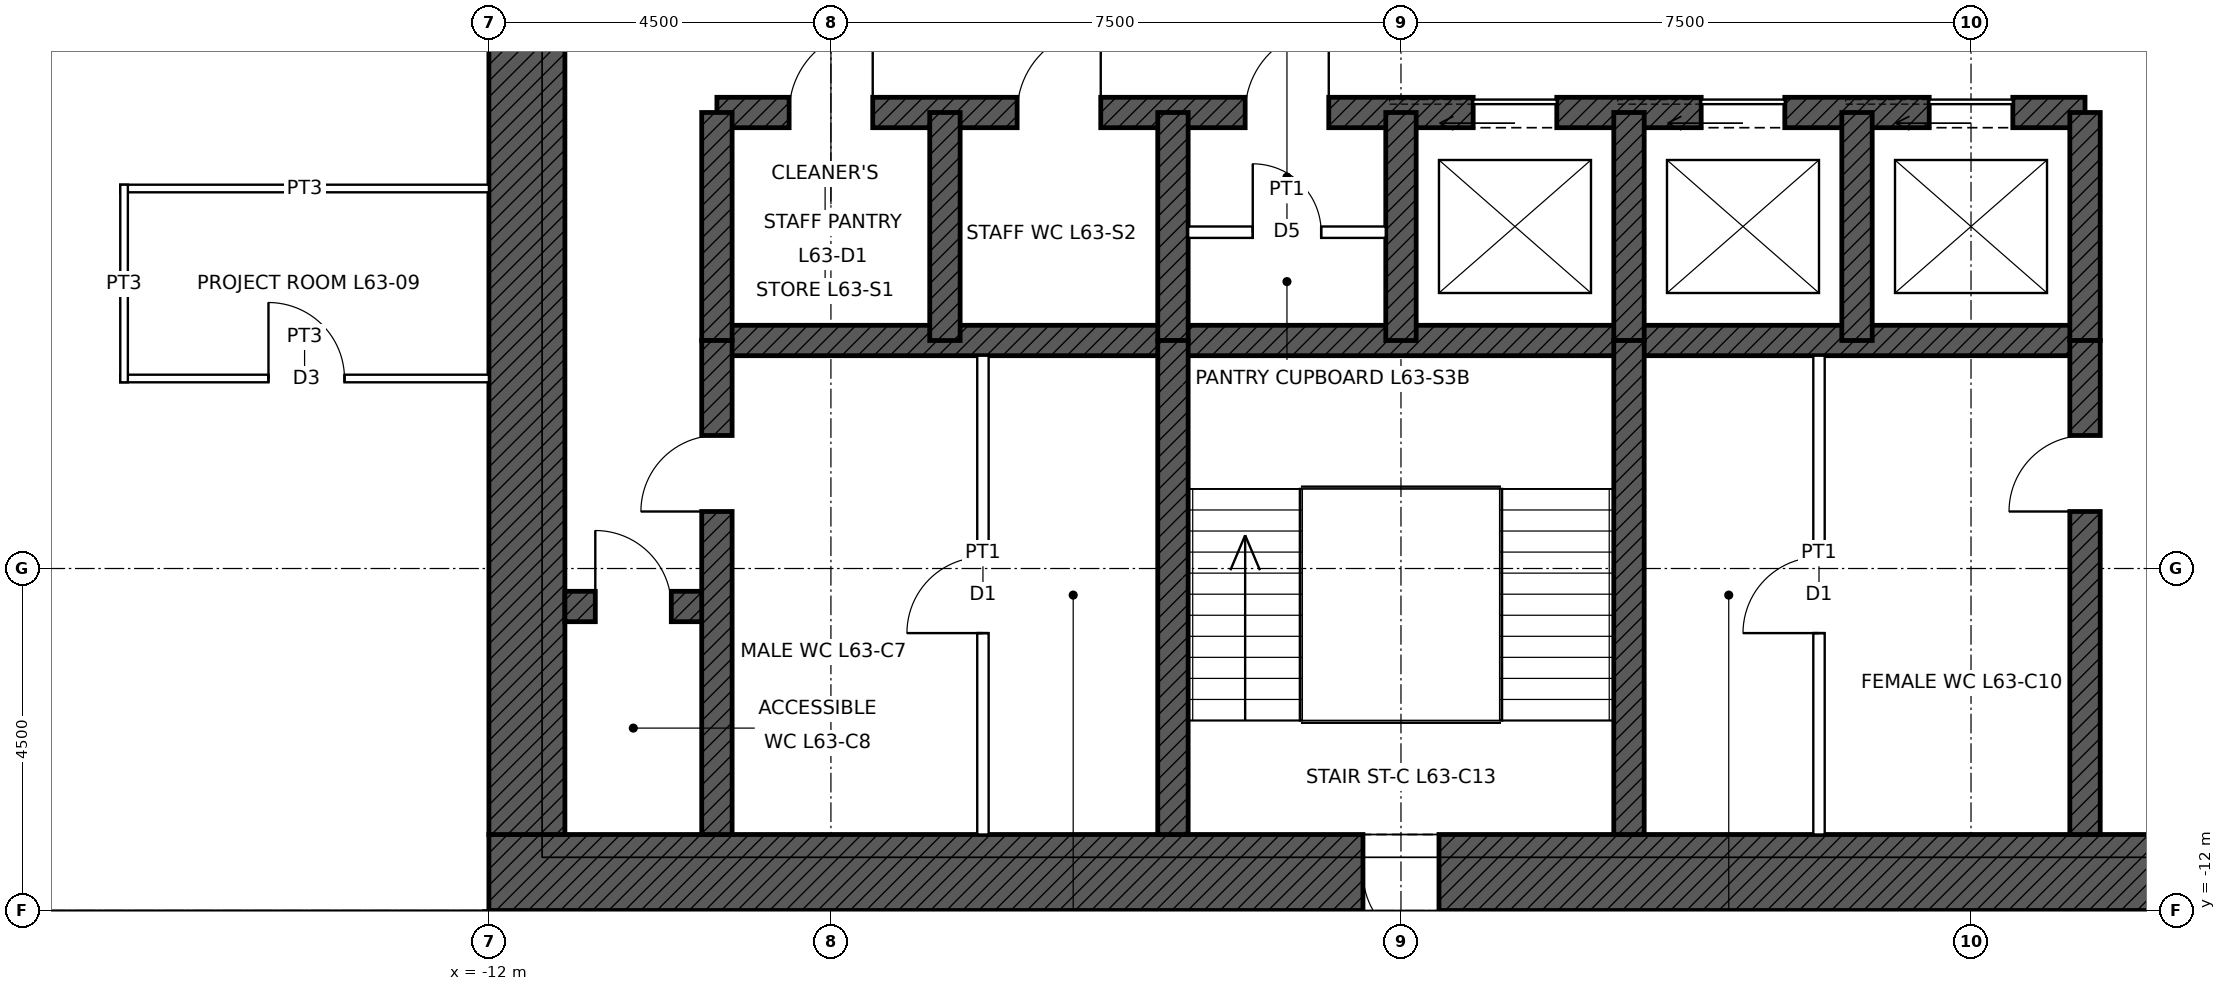
"""IFC4 building model, lengths in metres.
Left out: names, types, materials, properties, quantities, classifications, styles, units other than length and angle.
Written with IfcOpenShell. Run it as: python <this file> out.ifc"""

import sys

from ifc_helpers import new_model, si_unit, direction, frame, frame_2d, origin, place, context, subcontext, project, spatial, rectangle, extrude, element, fill, save


model = new_model("IFC4")
c1 = context("Model", 3, precision=1e-05, world=origin(), true_north=direction((0.0, 1.0)))
c2 = subcontext(c1, "Body", "Model", "MODEL_VIEW")
j1 = project(units=[si_unit("LENGTHUNIT", "METRE"), si_unit("PLANEANGLEUNIT", "RADIAN")], contexts=[c1])
p1 = place(None, origin())
s1 = spatial("IfcSite", under=j1, at=p1, CompositionType="ELEMENT")
p2 = place(p1, origin())
s2 = spatial("IfcBuilding", under=s1, at=p2, CompositionType="ELEMENT")
p3 = place(p2, frame((0.0, 0.0, 287.9)))
s3 = spatial("IfcBuildingStorey", under=s2, at=p3, CompositionType="ELEMENT", Elevation=287.9)
p4 = place(p3, frame((12.0, -11.5, 0.0), z_axis=(0.0, 0.0, 1.0), x_axis=(-1.0, 0.0, 0.0)))
e1 = element("IfcWall", 1, at=p4, inside=s3, PredefinedType="SHEAR", context=c2, shape_type="SweptSolid", body=[
    extrude(rectangle(XDim=24.0, YDim=1.0, at=frame_2d((12.0, 0.0))), origin(), (0.0, 0.0, 1.0), 4.0),
])
p5 = place(p4, frame((11.5, 0.0, 0.0)))
e2 = element("IfcOpeningElement", 2, at=p5, cuts=e1, PredefinedType="OPENING", context=c2, shape_type="SweptSolid", body=[
    extrude(rectangle(XDim=1.0, YDim=2.1, at=frame_2d((0.5, 1.05))), frame((0.0, 0.51, 0.0), z_axis=(0.0, -1.0, 0.0), x_axis=(1.0, 0.0, 0.0)), (0.0, 0.0, 1.0), 1.02),
])
p6 = place(p4, frame((1.0, 0.0, 0.0)))
e3 = element("IfcOpeningElement", 3, at=p6, cuts=e1, PredefinedType="OPENING", context=c2, shape_type="SweptSolid", body=[
    extrude(rectangle(XDim=1.0, YDim=2.4, at=frame_2d((0.5, 1.2))), frame((0.0, 0.51, 0.0), z_axis=(0.0, -1.0, 0.0), x_axis=(1.0, 0.0, 0.0)), (0.0, 0.0, 1.0), 1.02),
])
p7 = place(p3, frame((-11.5, -11.0, 0.0), z_axis=(0.0, 0.0, 1.0), x_axis=(0.0, 1.0, 0.0)))
e4 = element("IfcWall", 4, at=p7, inside=s3, PredefinedType="SHEAR", context=c2, shape_type="SweptSolid", body=[
    extrude(rectangle(XDim=22.0, YDim=1.0, at=frame_2d((11.0, 0.0))), origin(), (0.0, 0.0, 1.0), 4.0),
])
p8 = place(p7, frame((10.5, 0.0, 0.0)))
e5 = element("IfcOpeningElement", 5, at=p8, cuts=e4, PredefinedType="OPENING", context=c2, shape_type="SweptSolid", body=[
    extrude(rectangle(XDim=1.0, YDim=2.4, at=frame_2d((0.5, 1.2))), frame((0.0, 0.51, 0.0), z_axis=(0.0, -1.0, 0.0), x_axis=(1.0, 0.0, 0.0)), (0.0, 0.0, 1.0), 1.02),
])
p9 = place(p3, frame((-9.0, -1.5, 0.0), z_axis=(0.0, 0.0, 1.0), x_axis=(1.0, 0.0, 0.0)))
e6 = element("IfcWall", 6, at=p9, inside=s3, PredefinedType="SHEAR", context=c2, shape_type="SweptSolid", body=[
    extrude(rectangle(XDim=18.0, YDim=0.4, at=frame_2d((9.0, 0.0))), origin(), (0.0, 0.0, 1.0), 4.0),
])
p10 = place(p9, frame((9.95, 0.0, 0.0)))
e7 = element("IfcOpeningElement", 7, at=p10, cuts=e6, PredefinedType="OPENING", context=c2, shape_type="SweptSolid", body=[
    extrude(rectangle(XDim=1.1, YDim=2.1, at=frame_2d((0.55, 1.05))), frame((0.0, 0.21, 0.0), z_axis=(0.0, -1.0, 0.0), x_axis=(1.0, 0.0, 0.0)), (0.0, 0.0, 1.0), 0.42),
])
p11 = place(p9, frame((12.95, 0.0, 0.0)))
e8 = element("IfcOpeningElement", 8, at=p11, cuts=e6, PredefinedType="OPENING", context=c2, shape_type="SweptSolid", body=[
    extrude(rectangle(XDim=1.1, YDim=2.1, at=frame_2d((0.55, 1.05))), frame((0.0, 0.21, 0.0), z_axis=(0.0, -1.0, 0.0), x_axis=(1.0, 0.0, 0.0)), (0.0, 0.0, 1.0), 0.42),
])
p12 = place(p9, frame((15.95, 0.0, 0.0)))
e9 = element("IfcOpeningElement", 9, at=p12, cuts=e6, PredefinedType="OPENING", context=c2, shape_type="SweptSolid", body=[
    extrude(rectangle(XDim=1.1, YDim=2.1, at=frame_2d((0.55, 1.05))), frame((0.0, 0.21, 0.0), z_axis=(0.0, -1.0, 0.0), x_axis=(1.0, 0.0, 0.0)), (0.0, 0.0, 1.0), 0.42),
])
p13 = place(p9, frame((0.95, 0.0, 0.0)))
e10 = element("IfcOpeningElement", 10, at=p13, cuts=e6, PredefinedType="OPENING", context=c2, shape_type="SweptSolid", body=[
    extrude(rectangle(XDim=1.1, YDim=2.1, at=frame_2d((0.55, 1.05))), frame((0.0, 0.21, 0.0), z_axis=(0.0, -1.0, 0.0), x_axis=(1.0, 0.0, 0.0)), (0.0, 0.0, 1.0), 0.42),
])
p14 = place(p9, frame((3.95, 0.0, 0.0)))
e11 = element("IfcOpeningElement", 11, at=p14, cuts=e6, PredefinedType="OPENING", context=c2, shape_type="SweptSolid", body=[
    extrude(rectangle(XDim=1.1, YDim=2.1, at=frame_2d((0.55, 1.05))), frame((0.0, 0.21, 0.0), z_axis=(0.0, -1.0, 0.0), x_axis=(1.0, 0.0, 0.0)), (0.0, 0.0, 1.0), 0.42),
])
p15 = place(p9, frame((6.95, 0.0, 0.0)))
e12 = element("IfcOpeningElement", 12, at=p15, cuts=e6, PredefinedType="OPENING", context=c2, shape_type="SweptSolid", body=[
    extrude(rectangle(XDim=1.1, YDim=2.1, at=frame_2d((0.55, 1.05))), frame((0.0, 0.21, 0.0), z_axis=(0.0, -1.0, 0.0), x_axis=(1.0, 0.0, 0.0)), (0.0, 0.0, 1.0), 0.42),
])
p16 = place(p3, frame((-9.0, -4.5, 0.0), z_axis=(0.0, 0.0, 1.0), x_axis=(1.0, 0.0, 0.0)))
e13 = element("IfcWall", 13, at=p16, inside=s3, PredefinedType="SHEAR", context=c2, shape_type="SweptSolid", body=[
    extrude(rectangle(XDim=18.0, YDim=0.4, at=frame_2d((9.0, 0.0))), origin(), (0.0, 0.0, 1.0), 4.0),
])
p17 = place(p3, frame((-11.0, -8.0, 0.0), z_axis=(0.0, 0.0, 1.0), x_axis=(1.0, 0.0, 0.0)))
e14 = element("IfcWall", 14, at=p17, inside=s3, PredefinedType="SHEAR", context=c2, shape_type="SweptSolid", body=[
    extrude(rectangle(XDim=2.0, YDim=0.4, at=frame_2d((1.0, 0.0))), origin(), (0.0, 0.0, 1.0), 4.0),
])
p18 = place(p17, frame((0.4, 0.0, 0.0)))
e15 = element("IfcOpeningElement", 15, at=p18, cuts=e14, PredefinedType="OPENING", context=c2, shape_type="SweptSolid", body=[
    extrude(rectangle(XDim=1.0, YDim=2.1, at=frame_2d((0.5, 1.05))), frame((0.0, 0.21, 0.0), z_axis=(0.0, -1.0, 0.0), x_axis=(1.0, 0.0, 0.0)), (0.0, 0.0, 1.0), 0.42),
])
for number, where, z_axis, x_axis in (
    (16, (-9.0, -4.5, 0.0), (0.0, 0.0, 1.0), (0.0, 1.0, 0.0)),
    (17, (9.0, -4.5, 0.0), (0.0, 0.0, 1.0), (0.0, 1.0, 0.0)),
    (18, (-6.0, -4.5, 0.0), (0.0, 0.0, 1.0), (0.0, 1.0, 0.0)),
    (19, (-3.0, -4.5, 0.0), (0.0, 0.0, 1.0), (0.0, 1.0, 0.0)),
    (20, (0.0, -4.5, 0.0), (0.0, 0.0, 1.0), (0.0, 1.0, 0.0)),
    (21, (3.0, -4.5, 0.0), (0.0, 0.0, 1.0), (0.0, 1.0, 0.0)),
    (22, (6.0, -4.5, 0.0), (0.0, 0.0, 1.0), (0.0, 1.0, 0.0)),
):
    element("IfcWall", number, at=place(p3, frame(where, z_axis=z_axis, x_axis=x_axis)), inside=s3, PredefinedType="SHEAR", context=c2, shape_type="SweptSolid", body=[
        extrude(rectangle(XDim=3.0, YDim=0.4, at=frame_2d((1.5, 0.0))), origin(), (0.0, 0.0, 1.0), 4.0),
    ])
p19 = place(p3, frame((-9.0, -11.0, 0.0), z_axis=(0.0, 0.0, 1.0), x_axis=(0.0, 1.0, 0.0)))
e23 = element("IfcWall", 23, at=p19, inside=s3, PredefinedType="SHEAR", context=c2, shape_type="SweptSolid", body=[
    extrude(rectangle(XDim=6.5, YDim=0.4, at=frame_2d((3.25, 0.0))), origin(), (0.0, 0.0, 1.0), 4.0),
])
p20 = place(p19, frame((4.25, 0.0, 0.0)))
e24 = element("IfcOpeningElement", 24, at=p20, cuts=e23, PredefinedType="OPENING", context=c2, shape_type="SweptSolid", body=[
    extrude(rectangle(XDim=1.0, YDim=2.1, at=frame_2d((0.5, 1.05))), frame((0.0, 0.21, 0.0), z_axis=(0.0, -1.0, 0.0), x_axis=(1.0, 0.0, 0.0)), (0.0, 0.0, 1.0), 0.42),
])
p21 = place(p3, frame((9.0, -11.0, 0.0), z_axis=(0.0, 0.0, 1.0), x_axis=(0.0, 1.0, 0.0)))
e25 = element("IfcWall", 25, at=p21, inside=s3, PredefinedType="SHEAR", context=c2, shape_type="SweptSolid", body=[
    extrude(rectangle(XDim=6.5, YDim=0.4, at=frame_2d((3.25, 0.0))), origin(), (0.0, 0.0, 1.0), 4.0),
])
p22 = place(p21, frame((4.25, 0.0, 0.0)))
e26 = element("IfcOpeningElement", 26, at=p22, cuts=e25, PredefinedType="OPENING", context=c2, shape_type="SweptSolid", body=[
    extrude(rectangle(XDim=1.0, YDim=2.1, at=frame_2d((0.5, 1.05))), frame((0.0, 0.21, 0.0), z_axis=(0.0, -1.0, 0.0), x_axis=(1.0, 0.0, 0.0)), (0.0, 0.0, 1.0), 0.42),
])
for number, where, z_axis, x_axis in (
    (27, (-3.0, -11.0, 0.0), (0.0, 0.0, 1.0), (0.0, 1.0, 0.0)),
    (28, (3.0, -11.0, 0.0), (0.0, 0.0, 1.0), (0.0, 1.0, 0.0)),
):
    element("IfcWall", number, at=place(p3, frame(where, z_axis=z_axis, x_axis=x_axis)), inside=s3, PredefinedType="SHEAR", context=c2, shape_type="SweptSolid", body=[
        extrude(rectangle(XDim=6.5, YDim=0.4, at=frame_2d((3.25, 0.0))), origin(), (0.0, 0.0, 1.0), 4.0),
    ])
p23 = place(p3, frame((-16.85, -5.0, 0.0), z_axis=(0.0, 0.0, 1.0), x_axis=(1.0, 0.0, 0.0)))
e29 = element("IfcWall", 29, at=p23, inside=s3, PredefinedType="PARTITIONING", context=c2, shape_type="SweptSolid", body=[
    extrude(rectangle(XDim=4.85, YDim=0.1, at=frame_2d((2.425, 0.0))), origin(), (0.0, 0.0, 1.0), 3.85),
])
p24 = place(p23, frame((1.95, 0.0, 0.0)))
e30 = element("IfcOpeningElement", 30, at=p24, cuts=e29, PredefinedType="OPENING", context=c2, shape_type="SweptSolid", body=[
    extrude(rectangle(XDim=1.0, YDim=2.1, at=frame_2d((0.5, 1.05))), frame((0.0, 0.06, 0.0), z_axis=(0.0, -1.0, 0.0), x_axis=(1.0, 0.0, 0.0)), (0.0, 0.0, 1.0), 0.12),
])
p25 = place(p3, frame((-16.85, -2.5, 0.0), z_axis=(0.0, 0.0, 1.0), x_axis=(1.0, 0.0, 0.0)))
e31 = element("IfcWall", 31, at=p25, inside=s3, PredefinedType="PARTITIONING", context=c2, shape_type="SweptSolid", body=[
    extrude(rectangle(XDim=4.85, YDim=0.1, at=frame_2d((2.425, 0.0))), origin(), (0.0, 0.0, 1.0), 3.85),
])
p26 = place(p3, frame((-16.8, -5.05, 0.0), z_axis=(0.0, 0.0, 1.0), x_axis=(0.0, 1.0, 0.0)))
e32 = element("IfcWall", 32, at=p26, inside=s3, PredefinedType="PARTITIONING", context=c2, shape_type="SweptSolid", body=[
    extrude(rectangle(XDim=2.6, YDim=0.1, at=frame_2d((1.3, 0.0))), origin(), (0.0, 0.0, 1.0), 3.85),
])
p27 = place(p3, frame((-12.0, -13.575, 0.0), z_axis=(0.0, 0.0, 1.0), x_axis=(0.0, 1.0, 0.0)))
e33 = element("IfcWall", 33, at=p27, inside=s3, PredefinedType="PARTITIONING", context=c2, shape_type="SweptSolid", body=[
    extrude(rectangle(XDim=1.575, YDim=0.15, at=frame_2d((0.788, 0.0))), origin(), (0.0, 0.0, 1.0), 3.85),
])
p28 = place(p3, frame((-5.5, -11.0, 0.0), z_axis=(0.0, 0.0, 1.0), x_axis=(0.0, 1.0, 0.0)))
e34 = element("IfcWall", 34, at=p28, inside=s3, PredefinedType="PARTITIONING", context=c2, shape_type="SweptSolid", body=[
    extrude(rectangle(XDim=6.3, YDim=0.15, at=frame_2d((3.15, 0.0))), origin(), (0.0, 0.0, 1.0), 3.75),
])
p29 = place(p28, frame((2.65, 0.0, 0.0)))
e35 = element("IfcOpeningElement", 35, at=p29, cuts=e34, PredefinedType="OPENING", context=c2, shape_type="SweptSolid", body=[
    extrude(rectangle(XDim=1.0, YDim=2.1, at=frame_2d((0.5, 1.05))), frame((0.0, 0.085, 0.0), z_axis=(0.0, -1.0, 0.0), x_axis=(1.0, 0.0, 0.0)), (0.0, 0.0, 1.0), 0.17),
])
p30 = place(p3, frame((5.5, -11.0, 0.0), z_axis=(0.0, 0.0, 1.0), x_axis=(0.0, 1.0, 0.0)))
e36 = element("IfcWall", 36, at=p30, inside=s3, PredefinedType="PARTITIONING", context=c2, shape_type="SweptSolid", body=[
    extrude(rectangle(XDim=6.3, YDim=0.15, at=frame_2d((3.15, 0.0))), origin(), (0.0, 0.0, 1.0), 3.75),
])
p31 = place(p30, frame((2.65, 0.0, 0.0)))
e37 = element("IfcOpeningElement", 37, at=p31, cuts=e36, PredefinedType="OPENING", context=c2, shape_type="SweptSolid", body=[
    extrude(rectangle(XDim=1.0, YDim=2.1, at=frame_2d((0.5, 1.05))), frame((0.0, 0.085, 0.0), z_axis=(0.0, -1.0, 0.0), x_axis=(1.0, 0.0, 0.0)), (0.0, 0.0, 1.0), 0.17),
])
p32 = place(p3, frame((-2.8, -3.075, 0.0), z_axis=(0.0, 0.0, 1.0), x_axis=(1.0, 0.0, 0.0)))
e38 = element("IfcWall", 38, at=p32, inside=s3, PredefinedType="PARTITIONING", context=c2, shape_type="SweptSolid", body=[
    extrude(rectangle(XDim=2.6, YDim=0.15, at=frame_2d((1.3, 0.0))), origin(), (0.0, 0.0, 1.0), 3.75),
])
p33 = place(p32, frame((0.85, 0.0, 0.0)))
e39 = element("IfcOpeningElement", 39, at=p33, cuts=e38, PredefinedType="OPENING", context=c2, shape_type="SweptSolid", body=[
    extrude(rectangle(XDim=0.9, YDim=2.1, at=frame_2d((0.45, 1.05))), frame((0.0, 0.085, 0.0), z_axis=(0.0, -1.0, 0.0), x_axis=(1.0, 0.0, 0.0)), (0.0, 0.0, 1.0), 0.17),
])
p34 = place(p5, origin())
e40 = element("IfcDoor", 40, at=p34, inside=s3, OperationType="SINGLE_SWING_LEFT", PredefinedType="DOOR", context=c2, shape_type="SweptSolid", body=[
    extrude(rectangle(XDim=1.0, YDim=2.1, at=frame_2d((0.5, 1.05))), frame((0.0, 0.485, 0.0), z_axis=(0.0, -1.0, 0.0), x_axis=(1.0, 0.0, 0.0)), (0.0, 0.0, 1.0), 0.05),
])
fill(e2, e40)
p35 = place(p20, origin())
e41 = element("IfcDoor", 41, at=p35, inside=s3, OperationType="SINGLE_SWING_LEFT", PredefinedType="DOOR", context=c2, shape_type="SweptSolid", body=[
    extrude(rectangle(XDim=1.0, YDim=2.1, at=frame_2d((0.5, 1.05))), frame((0.0, 0.025, 0.0), z_axis=(0.0, -1.0, 0.0), x_axis=(1.0, 0.0, 0.0)), (0.0, 0.0, 1.0), 0.05),
])
fill(e24, e41)
p36 = place(p22, origin())
e42 = element("IfcDoor", 42, at=p36, inside=s3, OperationType="SINGLE_SWING_LEFT", PredefinedType="DOOR", context=c2, shape_type="SweptSolid", body=[
    extrude(rectangle(XDim=1.0, YDim=2.1, at=frame_2d((0.5, 1.05))), frame((0.0, 0.025, 0.0), z_axis=(0.0, -1.0, 0.0), x_axis=(1.0, 0.0, 0.0)), (0.0, 0.0, 1.0), 0.05),
])
fill(e26, e42)
p37 = place(p18, origin())
e43 = element("IfcDoor", 43, at=p37, inside=s3, OperationType="SINGLE_SWING_LEFT", PredefinedType="DOOR", context=c2, shape_type="SweptSolid", body=[
    extrude(rectangle(XDim=1.0, YDim=2.1, at=frame_2d((0.5, 1.05))), frame((0.0, 0.025, 0.0), z_axis=(0.0, -1.0, 0.0), x_axis=(1.0, 0.0, 0.0)), (0.0, 0.0, 1.0), 0.05),
])
fill(e15, e43)
p38 = place(p10, origin())
e44 = element("IfcDoor", 44, at=p38, inside=s3, OperationType="SLIDING_TO_LEFT", PredefinedType="DOOR", context=c2, shape_type="SweptSolid", body=[
    extrude(rectangle(XDim=1.1, YDim=2.1, at=frame_2d((0.55, 1.05))), frame((0.0, 0.025, 0.0), z_axis=(0.0, -1.0, 0.0), x_axis=(1.0, 0.0, 0.0)), (0.0, 0.0, 1.0), 0.05),
])
fill(e7, e44)
p39 = place(p11, origin())
e45 = element("IfcDoor", 45, at=p39, inside=s3, OperationType="SLIDING_TO_LEFT", PredefinedType="DOOR", context=c2, shape_type="SweptSolid", body=[
    extrude(rectangle(XDim=1.1, YDim=2.1, at=frame_2d((0.55, 1.05))), frame((0.0, 0.025, 0.0), z_axis=(0.0, -1.0, 0.0), x_axis=(1.0, 0.0, 0.0)), (0.0, 0.0, 1.0), 0.05),
])
fill(e8, e45)
p40 = place(p12, origin())
e46 = element("IfcDoor", 46, at=p40, inside=s3, OperationType="SLIDING_TO_LEFT", PredefinedType="DOOR", context=c2, shape_type="SweptSolid", body=[
    extrude(rectangle(XDim=1.1, YDim=2.1, at=frame_2d((0.55, 1.05))), frame((0.0, 0.025, 0.0), z_axis=(0.0, -1.0, 0.0), x_axis=(1.0, 0.0, 0.0)), (0.0, 0.0, 1.0), 0.05),
])
fill(e9, e46)
p41 = place(p29, origin())
e47 = element("IfcDoor", 47, at=p41, inside=s3, OperationType="SINGLE_SWING_LEFT", PredefinedType="DOOR", context=c2, shape_type="SweptSolid", body=[
    extrude(rectangle(XDim=1.0, YDim=2.1, at=frame_2d((0.5, 1.05))), frame((0.0, 0.025, 0.0), z_axis=(0.0, -1.0, 0.0), x_axis=(1.0, 0.0, 0.0)), (0.0, 0.0, 1.0), 0.05),
])
fill(e35, e47)
p42 = place(p31, origin())
e48 = element("IfcDoor", 48, at=p42, inside=s3, OperationType="SINGLE_SWING_LEFT", PredefinedType="DOOR", context=c2, shape_type="SweptSolid", body=[
    extrude(rectangle(XDim=1.0, YDim=2.1, at=frame_2d((0.5, 1.05))), frame((0.0, 0.025, 0.0), z_axis=(0.0, -1.0, 0.0), x_axis=(1.0, 0.0, 0.0)), (0.0, 0.0, 1.0), 0.05),
])
fill(e37, e48)
p43 = place(p13, origin())
e49 = element("IfcDoor", 49, at=p43, inside=s3, OperationType="SINGLE_SWING_RIGHT", PredefinedType="DOOR", context=c2, shape_type="SweptSolid", body=[
    extrude(rectangle(XDim=1.1, YDim=2.1, at=frame_2d((0.55, 1.05))), frame((0.0, 0.025, 0.0), z_axis=(0.0, -1.0, 0.0), x_axis=(1.0, 0.0, 0.0)), (0.0, 0.0, 1.0), 0.05),
])
fill(e10, e49)
p44 = place(p14, origin())
e50 = element("IfcDoor", 50, at=p44, inside=s3, OperationType="SINGLE_SWING_RIGHT", PredefinedType="DOOR", context=c2, shape_type="SweptSolid", body=[
    extrude(rectangle(XDim=1.1, YDim=2.1, at=frame_2d((0.55, 1.05))), frame((0.0, 0.025, 0.0), z_axis=(0.0, -1.0, 0.0), x_axis=(1.0, 0.0, 0.0)), (0.0, 0.0, 1.0), 0.05),
])
fill(e11, e50)
p45 = place(p15, origin())
e51 = element("IfcDoor", 51, at=p45, inside=s3, OperationType="SINGLE_SWING_RIGHT", PredefinedType="DOOR", context=c2, shape_type="SweptSolid", body=[
    extrude(rectangle(XDim=1.1, YDim=2.1, at=frame_2d((0.55, 1.05))), frame((0.0, 0.025, 0.0), z_axis=(0.0, -1.0, 0.0), x_axis=(1.0, 0.0, 0.0)), (0.0, 0.0, 1.0), 0.05),
])
fill(e12, e51)
p46 = place(p33, origin())
e52 = element("IfcDoor", 52, at=p46, inside=s3, OperationType="SINGLE_SWING_LEFT", PredefinedType="DOOR", context=c2, shape_type="SweptSolid", body=[
    extrude(rectangle(XDim=0.9, YDim=2.1, at=frame_2d((0.45, 1.05))), frame((0.0, 0.025, 0.0), z_axis=(0.0, -1.0, 0.0), x_axis=(1.0, 0.0, 0.0)), (0.0, 0.0, 1.0), 0.05),
])
fill(e39, e52)
p47 = place(p24, origin())
e53 = element("IfcDoor", 53, at=p47, inside=s3, OperationType="SINGLE_SWING_LEFT", PredefinedType="DOOR", context=c2, shape_type="SweptSolid", body=[
    extrude(rectangle(XDim=1.0, YDim=2.1, at=frame_2d((0.5, 1.05))), frame((0.0, 0.025, 0.0), z_axis=(0.0, -1.0, 0.0), x_axis=(1.0, 0.0, 0.0)), (0.0, 0.0, 1.0), 0.05),
])
fill(e30, e53)
save(model, sys.argv[1])
